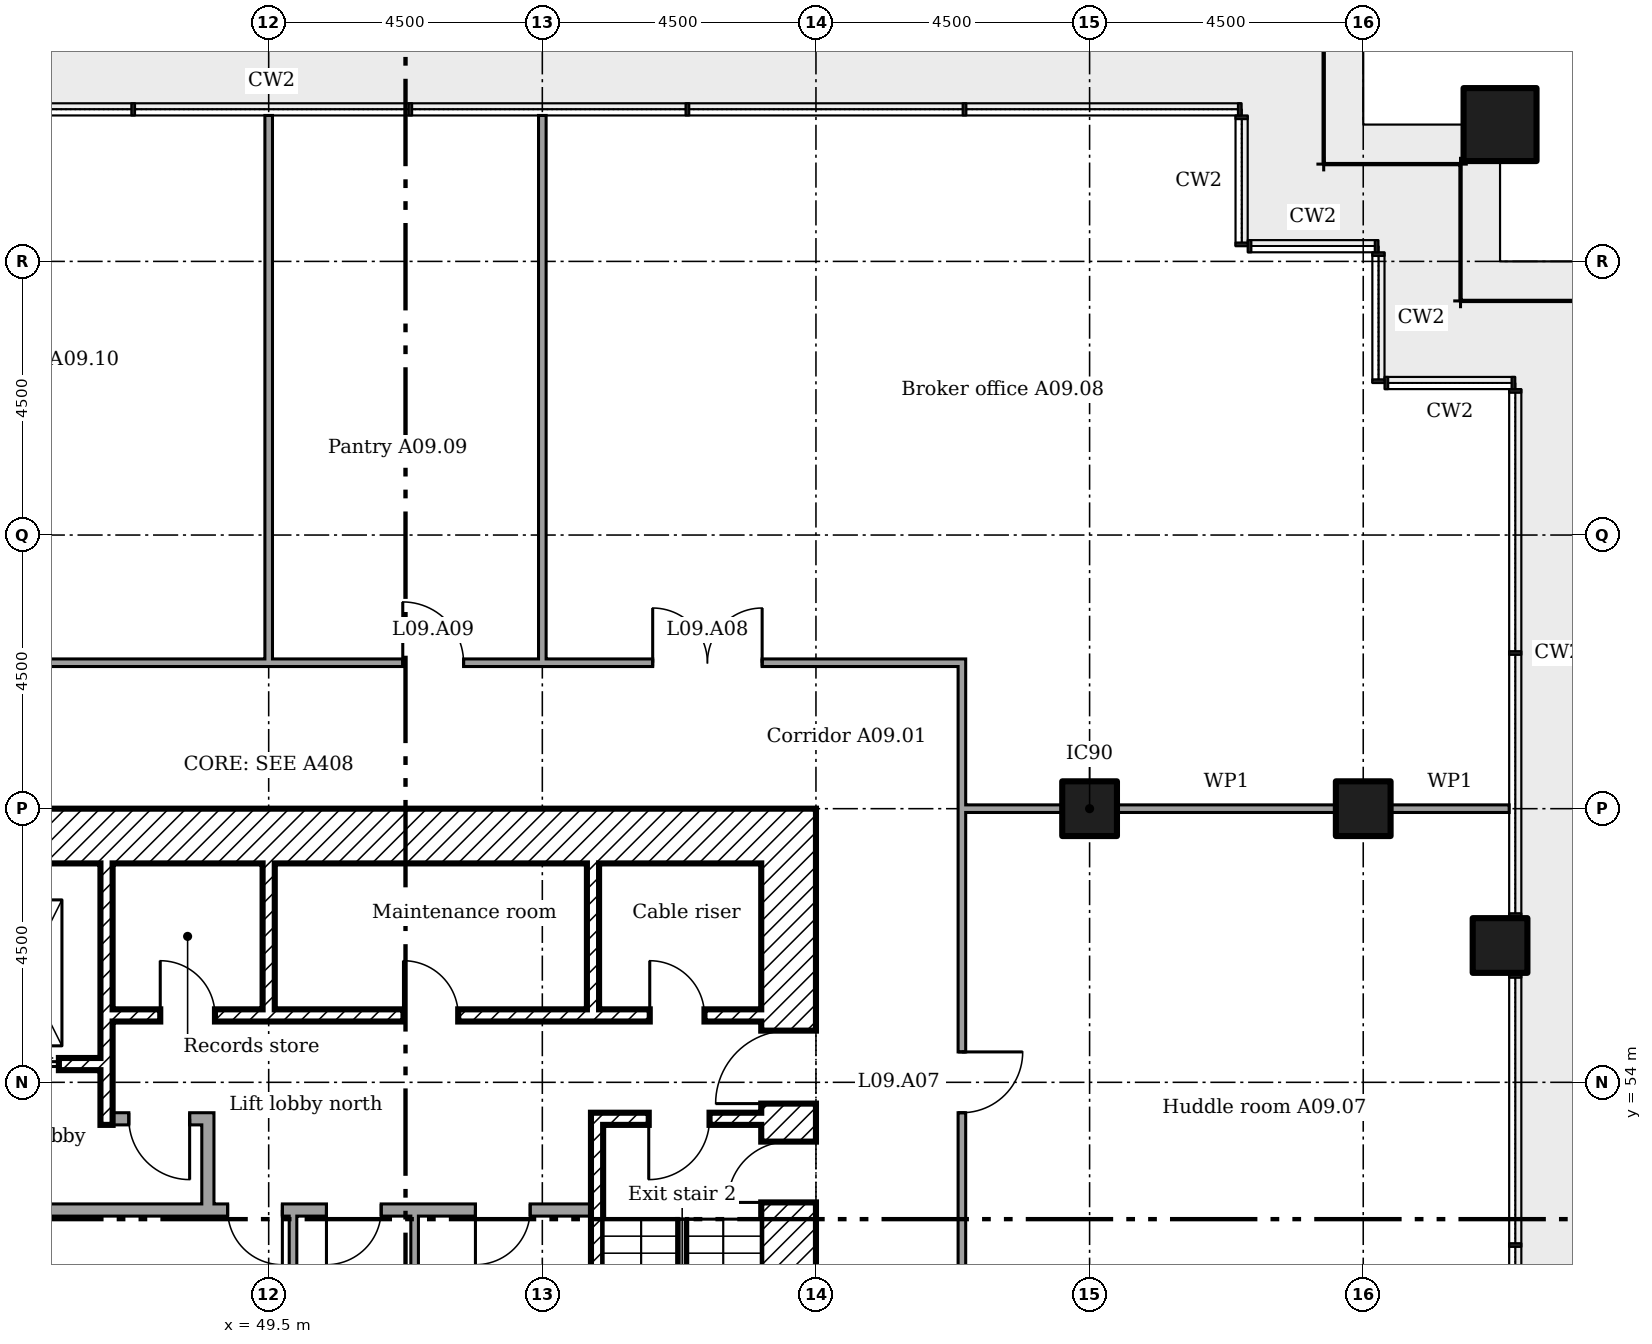
"""IFC4 building model, lengths in metres.
Left out: names, types, materials, properties, quantities, classifications, styles, units other than length and angle.
Written with IfcOpenShell. Run it as: python <this file> out.ifc"""

import sys

from ifc_helpers import new_model, si_unit, direction, frame, frame_2d, origin, origin_2d, place, context, subcontext, project, spatial, rectangle, extrude, element, fill, save


model = new_model("IFC4")
c1 = context("Model", 3, precision=1e-05, world=origin(), true_north=direction((0.0, 1.0)))
c2 = subcontext(c1, "Body", "Model", "MODEL_VIEW")
j1 = project(units=[si_unit("LENGTHUNIT", "METRE"), si_unit("PLANEANGLEUNIT", "RADIAN")], contexts=[c1])
p1 = place(None, origin())
s1 = spatial("IfcSite", under=j1, at=p1, CompositionType="ELEMENT")
p2 = place(p1, origin())
s2 = spatial("IfcBuilding", under=s1, at=p2, CompositionType="ELEMENT")
p3 = place(p2, frame((0.0, 0.0, 43.0)))
s3 = spatial("IfcBuildingStorey", under=s2, at=p3, CompositionType="ELEMENT", Elevation=43.0)
p4 = place(p3, frame((69.75, 69.75, 0.0)))
e1 = element("IfcColumn", 1, at=p4, inside=s3, PredefinedType="COLUMN", context=c2, shape_type="SweptSolid", body=[
    extrude(rectangle(XDim=1.2, YDim=1.2, at=origin_2d()), origin(), (0.0, 0.0, 1.0), 4.4),
])
for number, where in (
    (2, (63.0, 58.5, 0.0)),
    (3, (67.5, 58.5, 0.0)),
    (4, (69.75, 56.25, 0.0)),
):
    element("IfcColumn", number, at=place(p3, frame(where)), inside=s3, PredefinedType="COLUMN", context=c2, shape_type="SweptSolid", body=[
        extrude(rectangle(XDim=0.9, YDim=0.9, at=origin_2d()), origin(), (0.0, 0.0, 1.0), 4.4),
    ])
p5 = place(p3, frame((58.05, 40.5, 0.0), z_axis=(0.0, 0.0, 1.0), x_axis=(0.0, 1.0, 0.0)))
e5 = element("IfcWall", 5, at=p5, inside=s3, PredefinedType="SHEAR", context=c2, shape_type="SweptSolid", body=[
    extrude(rectangle(XDim=18.0, YDim=0.9, at=frame_2d((9.0, 0.0))), origin(), (0.0, 0.0, 1.0), 4.15),
])
p6 = place(p5, frame((13.15, 0.0, 0.0)))
e6 = element("IfcOpeningElement", 6, at=p6, cuts=e5, PredefinedType="OPENING", context=c2, shape_type="SweptSolid", body=[
    extrude(rectangle(XDim=1.2, YDim=2.1, at=frame_2d((0.6, 1.05))), frame((0.0, 0.46, 0.0), z_axis=(0.0, -1.0, 0.0), x_axis=(1.0, 0.0, 0.0)), (0.0, 0.0, 1.0), 0.92),
])
p7 = place(p5, frame((3.9, 0.0, 0.0)))
e7 = element("IfcOpeningElement", 7, at=p7, cuts=e5, PredefinedType="OPENING", context=c2, shape_type="SweptSolid", body=[
    extrude(rectangle(XDim=1.8, YDim=2.1, at=frame_2d((0.9, 1.05))), frame((0.0, 0.46, 0.0), z_axis=(0.0, -1.0, 0.0), x_axis=(1.0, 0.0, 0.0)), (0.0, 0.0, 1.0), 0.92),
])
p8 = place(p5, frame((11.525, 0.0, 0.0)))
e8 = element("IfcOpeningElement", 8, at=p8, cuts=e5, PredefinedType="OPENING", context=c2, shape_type="SweptSolid", body=[
    extrude(rectangle(XDim=1.0, YDim=2.1, at=frame_2d((0.5, 1.05))), frame((0.0, 0.46, 0.0), z_axis=(0.0, -1.0, 0.0), x_axis=(1.0, 0.0, 0.0)), (0.0, 0.0, 1.0), 0.92),
])
p9 = place(p3, frame((41.4, 58.05, 0.0)))
e9 = element("IfcWall", 9, at=p9, inside=s3, PredefinedType="SHEAR", context=c2, shape_type="SweptSolid", body=[
    extrude(rectangle(XDim=16.2, YDim=0.9, at=frame_2d((8.1, 0.0))), origin(), (0.0, 0.0, 1.0), 4.15),
])
p10 = place(p3, frame((46.833, 57.6, 0.0), z_axis=(0.0, 0.0, 1.0), x_axis=(0.0, -1.0, 0.0)))
e10 = element("IfcWall", 10, at=p10, inside=s3, PredefinedType="SHEAR", context=c2, shape_type="SweptSolid", body=[
    extrude(rectangle(XDim=4.3, YDim=0.2, at=frame_2d((2.15, 0.0))), origin(), (0.0, 0.0, 1.0), 4.15),
])
for number, where, z_axis, x_axis in (
    (11, (49.5, 57.6, 0.0), (0.0, 0.0, 1.0), (0.0, -1.0, 0.0)),
    (12, (54.833, 57.6, 0.0), (0.0, 0.0, 1.0), (0.0, -1.0, 0.0)),
):
    element("IfcWall", number, at=place(p3, frame(where, z_axis=z_axis, x_axis=x_axis)), inside=s3, PredefinedType="SHEAR", context=c2, shape_type="SweptSolid", body=[
        extrude(rectangle(XDim=2.4, YDim=0.2, at=frame_2d((1.2, 0.0))), origin(), (0.0, 0.0, 1.0), 4.15),
    ])
p11 = place(p3, frame((48.5, 51.9, 0.0), z_axis=(0.0, 0.0, 1.0), x_axis=(0.0, 1.0, 0.0)))
e13 = element("IfcWall", 13, at=p11, inside=s3, PredefinedType="PARTITIONING", context=c2, shape_type="SweptSolid", body=[
    extrude(rectangle(XDim=1.6, YDim=0.2, at=frame_2d((0.8, 0.0))), origin(), (0.0, 0.0, 1.0), 4.15),
])
p12 = place(p3, frame((46.933, 53.4, 0.0)))
e14 = element("IfcWall", 14, at=p12, inside=s3, PredefinedType="PARTITIONING", context=c2, shape_type="SweptSolid", body=[
    extrude(rectangle(XDim=1.467, YDim=0.2, at=frame_2d((0.733, 0.0))), origin(), (0.0, 0.0, 1.0), 4.15),
])
p13 = place(p12, frame((0.267, 0.0, 0.0)))
e15 = element("IfcOpeningElement", 15, at=p13, cuts=e14, PredefinedType="OPENING", context=c2, shape_type="SweptSolid", body=[
    extrude(rectangle(XDim=1.0, YDim=2.1, at=frame_2d((0.5, 1.05))), frame((0.0, 0.11, 0.0), z_axis=(0.0, -1.0, 0.0), x_axis=(1.0, 0.0, 0.0)), (0.0, 0.0, 1.0), 0.22),
])
p14 = place(p3, frame((46.933, 55.1, 0.0)))
e16 = element("IfcWall", 16, at=p14, inside=s3, PredefinedType="SHEAR", context=c2, shape_type="SweptSolid", body=[
    extrude(rectangle(XDim=10.667, YDim=0.2, at=frame_2d((5.333, 0.0))), origin(), (0.0, 0.0, 1.0), 4.15),
])
p15 = place(p14, frame((8.833, 0.0, 0.0)))
e17 = element("IfcOpeningElement", 17, at=p15, cuts=e16, PredefinedType="OPENING", context=c2, shape_type="SweptSolid", body=[
    extrude(rectangle(XDim=0.9, YDim=2.1, at=frame_2d((0.45, 1.05))), frame((0.0, 0.11, 0.0), z_axis=(0.0, -1.0, 0.0), x_axis=(1.0, 0.0, 0.0)), (0.0, 0.0, 1.0), 0.22),
])
p16 = place(p14, frame((0.783, 0.0, 0.0)))
e18 = element("IfcOpeningElement", 18, at=p16, cuts=e16, PredefinedType="OPENING", context=c2, shape_type="SweptSolid", body=[
    extrude(rectangle(XDim=0.9, YDim=2.1, at=frame_2d((0.45, 1.05))), frame((0.0, 0.11, 0.0), z_axis=(0.0, -1.0, 0.0), x_axis=(1.0, 0.0, 0.0)), (0.0, 0.0, 1.0), 0.22),
])
p17 = place(p14, frame((4.783, 0.0, 0.0)))
e19 = element("IfcOpeningElement", 19, at=p17, cuts=e16, PredefinedType="OPENING", context=c2, shape_type="SweptSolid", body=[
    extrude(rectangle(XDim=0.9, YDim=2.1, at=frame_2d((0.45, 1.05))), frame((0.0, 0.11, 0.0), z_axis=(0.0, -1.0, 0.0), x_axis=(1.0, 0.0, 0.0)), (0.0, 0.0, 1.0), 0.22),
])
p18 = place(p3, frame((41.4, 54.3, 0.0)))
e20 = element("IfcWall", 20, at=p18, inside=s3, PredefinedType="SHEAR", context=c2, shape_type="SweptSolid", body=[
    extrude(rectangle(XDim=5.333, YDim=0.2, at=frame_2d((2.667, 0.0))), origin(), (0.0, 0.0, 1.0), 4.15),
])
p19 = place(p18, frame((0.883, 0.0, 0.0)))
e21 = element("IfcOpeningElement", 21, at=p19, cuts=e20, PredefinedType="OPENING", context=c2, shape_type="SweptSolid", body=[
    extrude(rectangle(XDim=1.1, YDim=2.1, at=frame_2d((0.55, 1.05))), frame((0.0, 0.11, 0.0), z_axis=(0.0, -1.0, 0.0), x_axis=(1.0, 0.0, 0.0)), (0.0, 0.0, 1.0), 0.22),
])
p20 = place(p18, frame((3.55, 0.0, 0.0)))
e22 = element("IfcOpeningElement", 22, at=p20, cuts=e20, PredefinedType="OPENING", context=c2, shape_type="SweptSolid", body=[
    extrude(rectangle(XDim=1.1, YDim=2.1, at=frame_2d((0.55, 1.05))), frame((0.0, 0.11, 0.0), z_axis=(0.0, -1.0, 0.0), x_axis=(1.0, 0.0, 0.0)), (0.0, 0.0, 1.0), 0.22),
])
p21 = place(p3, frame((54.8, 53.4, 0.0)))
e23 = element("IfcWall", 23, at=p21, inside=s3, PredefinedType="SHEAR", context=c2, shape_type="SweptSolid", body=[
    extrude(rectangle(XDim=2.8, YDim=0.2, at=frame_2d((1.4, 0.0))), origin(), (0.0, 0.0, 1.0), 4.15),
])
p22 = place(p21, frame((0.95, 0.0, 0.0)))
e24 = element("IfcOpeningElement", 24, at=p22, cuts=e23, PredefinedType="OPENING", context=c2, shape_type="SweptSolid", body=[
    extrude(rectangle(XDim=1.0, YDim=2.1, at=frame_2d((0.5, 1.05))), frame((0.0, 0.11, 0.0), z_axis=(0.0, -1.0, 0.0), x_axis=(1.0, 0.0, 0.0)), (0.0, 0.0, 1.0), 0.22),
])
p23 = place(p3, frame((54.9, 46.8, 0.0), z_axis=(0.0, 0.0, 1.0), x_axis=(0.0, 1.0, 0.0)))
e25 = element("IfcWall", 25, at=p23, inside=s3, PredefinedType="SHEAR", context=c2, shape_type="SweptSolid", body=[
    extrude(rectangle(XDim=6.5, YDim=0.2, at=frame_2d((3.25, 0.0))), origin(), (0.0, 0.0, 1.0), 4.15),
])
p24 = place(p3, frame((44.2, 51.9, 0.0)))
e26 = element("IfcWall", 26, at=p24, inside=s3, PredefinedType="PARTITIONING", context=c2, shape_type="SweptSolid", body=[
    extrude(rectangle(XDim=10.6, YDim=0.2, at=frame_2d((5.3, 0.0))), origin(), (0.0, 0.0, 1.0), 4.15),
])
p25 = place(p24, frame((4.625, 0.0, 0.0)))
e27 = element("IfcOpeningElement", 27, at=p25, cuts=e26, PredefinedType="OPENING", context=c2, shape_type="SweptSolid", body=[
    extrude(rectangle(XDim=0.9, YDim=2.1, at=frame_2d((0.45, 1.05))), frame((0.0, 0.11, 0.0), z_axis=(0.0, -1.0, 0.0), x_axis=(1.0, 0.0, 0.0)), (0.0, 0.0, 1.0), 0.22),
])
p26 = place(p24, frame((6.25, 0.0, 0.0)))
e28 = element("IfcOpeningElement", 28, at=p26, cuts=e26, PredefinedType="OPENING", context=c2, shape_type="SweptSolid", body=[
    extrude(rectangle(XDim=0.9, YDim=2.1, at=frame_2d((0.45, 1.05))), frame((0.0, 0.11, 0.0), z_axis=(0.0, -1.0, 0.0), x_axis=(1.0, 0.0, 0.0)), (0.0, 0.0, 1.0), 0.22),
])
p27 = place(p24, frame((8.7, 0.0, 0.0)))
e29 = element("IfcOpeningElement", 29, at=p27, cuts=e26, PredefinedType="OPENING", context=c2, shape_type="SweptSolid", body=[
    extrude(rectangle(XDim=0.9, YDim=2.1, at=frame_2d((0.45, 1.05))), frame((0.0, 0.11, 0.0), z_axis=(0.0, -1.0, 0.0), x_axis=(1.0, 0.0, 0.0)), (0.0, 0.0, 1.0), 0.22),
])
for number, where, z_axis, x_axis in (
    (30, (49.9, 48.163, 0.0), (0.0, 0.0, 1.0), (0.0, 1.0, 0.0)),
    (31, (51.9, 48.163, 0.0), (0.0, 0.0, 1.0), (0.0, 1.0, 0.0)),
):
    element("IfcWall", number, at=place(p3, frame(where, z_axis=z_axis, x_axis=x_axis)), inside=s3, PredefinedType="PARTITIONING", context=c2, shape_type="SweptSolid", body=[
        extrude(rectangle(XDim=3.637, YDim=0.125, at=frame_2d((1.819, 0.0))), origin(), (0.0, 0.0, 1.0), 4.15),
    ])
p28 = place(p3, frame((60.9, 58.5, 0.0)))
e32 = element("IfcWall", 32, at=p28, inside=s3, PredefinedType="PARTITIONING", context=c2, shape_type="SweptSolid", body=[
    extrude(rectangle(XDim=1.65, YDim=0.125, at=frame_2d((0.825, 0.0))), origin(), (0.0, 0.0, 1.0), 3.476),
])
p29 = place(p3, frame((63.45, 58.5, 0.0)))
e33 = element("IfcWall", 33, at=p29, inside=s3, PredefinedType="PARTITIONING", context=c2, shape_type="SweptSolid", body=[
    extrude(rectangle(XDim=3.6, YDim=0.125, at=frame_2d((1.8, 0.0))), origin(), (0.0, 0.0, 1.0), 3.476),
])
p30 = place(p3, frame((67.95, 58.5, 0.0)))
e34 = element("IfcWall", 34, at=p30, inside=s3, PredefinedType="PARTITIONING", context=c2, shape_type="SweptSolid", body=[
    extrude(rectangle(XDim=1.95, YDim=0.125, at=frame_2d((0.975, 0.0))), origin(), (0.0, 0.0, 1.0), 3.476),
])
p31 = place(p3, frame((38.038, 60.9, 0.0)))
e35 = element("IfcWall", 35, at=p31, inside=s3, PredefinedType="PARTITIONING", context=c2, shape_type="SweptSolid", body=[
    extrude(rectangle(XDim=22.925, YDim=0.125, at=frame_2d((11.462, 0.0))), origin(), (0.0, 0.0, 1.0), 4.25),
])
p32 = place(p31, frame((17.778, 0.0, 0.0)))
e36 = element("IfcOpeningElement", 36, at=p32, cuts=e35, PredefinedType="OPENING", context=c2, shape_type="SweptSolid", body=[
    extrude(rectangle(XDim=1.8, YDim=2.1, at=frame_2d((0.9, 1.05))), frame((0.0, 0.073, 0.0), z_axis=(0.0, -1.0, 0.0), x_axis=(1.0, 0.0, 0.0)), (0.0, 0.0, 1.0), 0.145),
])
p33 = place(p31, frame((13.667, 0.0, 0.0)))
e37 = element("IfcOpeningElement", 37, at=p33, cuts=e35, PredefinedType="OPENING", context=c2, shape_type="SweptSolid", body=[
    extrude(rectangle(XDim=1.0, YDim=2.1, at=frame_2d((0.5, 1.05))), frame((0.0, 0.073, 0.0), z_axis=(0.0, -1.0, 0.0), x_axis=(1.0, 0.0, 0.0)), (0.0, 0.0, 1.0), 0.145),
])
p34 = place(p31, frame((6.462, 0.0, 0.0)))
e38 = element("IfcOpeningElement", 38, at=p34, cuts=e35, PredefinedType="OPENING", context=c2, shape_type="SweptSolid", body=[
    extrude(rectangle(XDim=1.0, YDim=2.1, at=frame_2d((0.5, 1.05))), frame((0.0, 0.073, 0.0), z_axis=(0.0, -1.0, 0.0), x_axis=(1.0, 0.0, 0.0)), (0.0, 0.0, 1.0), 0.145),
])
for number, where, z_axis, x_axis in (
    (39, (49.5, 60.9, 0.0), (0.0, 0.0, 1.0), (0.0, 1.0, 0.0)),
    (40, (54.0, 60.9, 0.0), (0.0, 0.0, 1.0), (0.0, 1.0, 0.0)),
):
    element("IfcWall", number, at=place(p3, frame(where, z_axis=z_axis, x_axis=x_axis)), inside=s3, PredefinedType="PARTITIONING", context=c2, shape_type="SweptSolid", body=[
        extrude(rectangle(XDim=9.0, YDim=0.125, at=frame_2d((4.5, 0.0))), origin(), (0.0, 0.0, 1.0), 3.566),
    ])
p35 = place(p3, frame((60.9, 37.863, 0.0), z_axis=(0.0, 0.0, 1.0), x_axis=(0.0, 1.0, 0.0)))
e41 = element("IfcWall", 41, at=p35, inside=s3, PredefinedType="PARTITIONING", context=c2, shape_type="SweptSolid", body=[
    extrude(rectangle(XDim=22.975, YDim=0.125, at=frame_2d((11.487, 0.0))), origin(), (0.0, 0.0, 1.0), 4.25),
])
p36 = place(p35, frame((3.933, 0.0, 0.0)))
e42 = element("IfcOpeningElement", 42, at=p36, cuts=e41, PredefinedType="OPENING", context=c2, shape_type="SweptSolid", body=[
    extrude(rectangle(XDim=1.0, YDim=2.1, at=frame_2d((0.5, 1.05))), frame((0.0, 0.073, 0.0), z_axis=(0.0, -1.0, 0.0), x_axis=(1.0, 0.0, 0.0)), (0.0, 0.0, 1.0), 0.145),
])
p37 = place(p35, frame((9.343, 0.0, 0.0)))
e43 = element("IfcOpeningElement", 43, at=p37, cuts=e41, PredefinedType="OPENING", context=c2, shape_type="SweptSolid", body=[
    extrude(rectangle(XDim=1.0, YDim=2.1, at=frame_2d((0.5, 1.05))), frame((0.0, 0.073, 0.0), z_axis=(0.0, -1.0, 0.0), x_axis=(1.0, 0.0, 0.0)), (0.0, 0.0, 1.0), 0.145),
])
p38 = place(p35, frame((15.637, 0.0, 0.0)))
e44 = element("IfcOpeningElement", 44, at=p38, cuts=e41, PredefinedType="OPENING", context=c2, shape_type="SweptSolid", body=[
    extrude(rectangle(XDim=1.0, YDim=2.1, at=frame_2d((0.5, 1.05))), frame((0.0, 0.073, 0.0), z_axis=(0.0, -1.0, 0.0), x_axis=(1.0, 0.0, 0.0)), (0.0, 0.0, 1.0), 0.145),
])
p39 = place(p6, origin())
e45 = element("IfcDoor", 45, at=p39, inside=s3, OperationType="SINGLE_SWING_RIGHT", PredefinedType="DOOR", context=c2, shape_type="SweptSolid", body=[
    extrude(rectangle(XDim=1.2, YDim=2.1, at=frame_2d((0.6, 1.05))), frame((0.0, 0.025, 0.0), z_axis=(0.0, -1.0, 0.0), x_axis=(1.0, 0.0, 0.0)), (0.0, 0.0, 1.0), 0.05),
])
fill(e6, e45)
p40 = place(p22, frame((1.0, 0.0, 0.0), x_axis=(-1.0, 0.0, 0.0)))
e46 = element("IfcDoor", 46, at=p40, inside=s3, OperationType="SINGLE_SWING_LEFT", PredefinedType="DOOR", context=c2, shape_type="SweptSolid", body=[
    extrude(rectangle(XDim=1.0, YDim=2.1, at=frame_2d((0.5, 1.05))), frame((0.0, 0.025, 0.0), z_axis=(0.0, -1.0, 0.0), x_axis=(1.0, 0.0, 0.0)), (0.0, 0.0, 1.0), 0.05),
])
fill(e24, e46)
p41 = place(p8, origin())
e47 = element("IfcDoor", 47, at=p41, inside=s3, OperationType="SINGLE_SWING_RIGHT", PredefinedType="DOOR", context=c2, shape_type="SweptSolid", body=[
    extrude(rectangle(XDim=1.0, YDim=2.1, at=frame_2d((0.5, 1.05))), frame((0.0, 0.025, 0.0), z_axis=(0.0, -1.0, 0.0), x_axis=(1.0, 0.0, 0.0)), (0.0, 0.0, 1.0), 0.05),
])
fill(e8, e47)
p42 = place(p13, frame((1.0, 0.0, 0.0), x_axis=(-1.0, 0.0, 0.0)))
e48 = element("IfcDoor", 48, at=p42, inside=s3, OperationType="SINGLE_SWING_RIGHT", PredefinedType="DOOR", context=c2, shape_type="SweptSolid", body=[
    extrude(rectangle(XDim=1.0, YDim=2.1, at=frame_2d((0.5, 1.05))), frame((0.0, 0.025, 0.0), z_axis=(0.0, -1.0, 0.0), x_axis=(1.0, 0.0, 0.0)), (0.0, 0.0, 1.0), 0.05),
])
fill(e15, e48)
p43 = place(p15, origin())
e49 = element("IfcDoor", 49, at=p43, inside=s3, OperationType="SINGLE_SWING_RIGHT", PredefinedType="DOOR", context=c2, shape_type="SweptSolid", body=[
    extrude(rectangle(XDim=0.9, YDim=2.1, at=frame_2d((0.45, 1.05))), frame((0.0, 0.025, 0.0), z_axis=(0.0, -1.0, 0.0), x_axis=(1.0, 0.0, 0.0)), (0.0, 0.0, 1.0), 0.05),
])
fill(e17, e49)
p44 = place(p16, origin())
e50 = element("IfcDoor", 50, at=p44, inside=s3, OperationType="SINGLE_SWING_RIGHT", PredefinedType="DOOR", context=c2, shape_type="SweptSolid", body=[
    extrude(rectangle(XDim=0.9, YDim=2.1, at=frame_2d((0.45, 1.05))), frame((0.0, 0.025, 0.0), z_axis=(0.0, -1.0, 0.0), x_axis=(1.0, 0.0, 0.0)), (0.0, 0.0, 1.0), 0.05),
])
fill(e18, e50)
p45 = place(p17, origin())
e51 = element("IfcDoor", 51, at=p45, inside=s3, OperationType="SINGLE_SWING_RIGHT", PredefinedType="DOOR", context=c2, shape_type="SweptSolid", body=[
    extrude(rectangle(XDim=0.9, YDim=2.1, at=frame_2d((0.45, 1.05))), frame((0.0, 0.025, 0.0), z_axis=(0.0, -1.0, 0.0), x_axis=(1.0, 0.0, 0.0)), (0.0, 0.0, 1.0), 0.05),
])
fill(e19, e51)
p46 = place(p25, frame((0.9, 0.0, 0.0), x_axis=(-1.0, 0.0, 0.0)))
e52 = element("IfcDoor", 52, at=p46, inside=s3, OperationType="SINGLE_SWING_RIGHT", PredefinedType="DOOR", context=c2, shape_type="SweptSolid", body=[
    extrude(rectangle(XDim=0.9, YDim=2.1, at=frame_2d((0.45, 1.05))), frame((0.0, 0.025, 0.0), z_axis=(0.0, -1.0, 0.0), x_axis=(1.0, 0.0, 0.0)), (0.0, 0.0, 1.0), 0.05),
])
fill(e27, e52)
p47 = place(p26, frame((0.9, 0.0, 0.0), x_axis=(-1.0, 0.0, 0.0)))
e53 = element("IfcDoor", 53, at=p47, inside=s3, OperationType="SINGLE_SWING_LEFT", PredefinedType="DOOR", context=c2, shape_type="SweptSolid", body=[
    extrude(rectangle(XDim=0.9, YDim=2.1, at=frame_2d((0.45, 1.05))), frame((0.0, 0.025, 0.0), z_axis=(0.0, -1.0, 0.0), x_axis=(1.0, 0.0, 0.0)), (0.0, 0.0, 1.0), 0.05),
])
fill(e28, e53)
p48 = place(p27, frame((0.9, 0.0, 0.0), x_axis=(-1.0, 0.0, 0.0)))
e54 = element("IfcDoor", 54, at=p48, inside=s3, OperationType="SINGLE_SWING_LEFT", PredefinedType="DOOR", context=c2, shape_type="SweptSolid", body=[
    extrude(rectangle(XDim=0.9, YDim=2.1, at=frame_2d((0.45, 1.05))), frame((0.0, 0.025, 0.0), z_axis=(0.0, -1.0, 0.0), x_axis=(1.0, 0.0, 0.0)), (0.0, 0.0, 1.0), 0.05),
])
fill(e29, e54)
p49 = place(p20, origin())
e55 = element("IfcDoor", 55, at=p49, inside=s3, OperationType="SLIDING_TO_LEFT", PredefinedType="DOOR", context=c2, shape_type="SweptSolid", body=[
    extrude(rectangle(XDim=1.1, YDim=2.1, at=frame_2d((0.55, 1.05))), frame((0.0, 0.025, 0.0), z_axis=(0.0, -1.0, 0.0), x_axis=(1.0, 0.0, 0.0)), (0.0, 0.0, 1.0), 0.05),
])
fill(e22, e55)
p50 = place(p38, frame((1.0, 0.0, 0.0), x_axis=(-1.0, 0.0, 0.0)))
e56 = element("IfcDoor", 56, at=p50, inside=s3, OperationType="SINGLE_SWING_RIGHT", PredefinedType="DOOR", context=c2, shape_type="SweptSolid", body=[
    extrude(rectangle(XDim=1.0, YDim=2.1, at=frame_2d((0.5, 1.05))), frame((0.0, 0.025, 0.0), z_axis=(0.0, -1.0, 0.0), x_axis=(1.0, 0.0, 0.0)), (0.0, 0.0, 1.0), 0.05),
])
fill(e44, e56)
p51 = place(p32, origin())
e57 = element("IfcDoor", 57, at=p51, inside=s3, OperationType="DOUBLE_DOOR_SINGLE_SWING", PredefinedType="DOOR", context=c2, shape_type="SweptSolid", body=[
    extrude(rectangle(XDim=1.8, YDim=2.1, at=frame_2d((0.9, 1.05))), frame((0.0, 0.025, 0.0), z_axis=(0.0, -1.0, 0.0), x_axis=(1.0, 0.0, 0.0)), (0.0, 0.0, 1.0), 0.05),
])
fill(e36, e57)
p52 = place(p33, origin())
e58 = element("IfcDoor", 58, at=p52, inside=s3, OperationType="SINGLE_SWING_RIGHT", PredefinedType="DOOR", context=c2, shape_type="SweptSolid", body=[
    extrude(rectangle(XDim=1.0, YDim=2.1, at=frame_2d((0.5, 1.05))), frame((0.0, 0.025, 0.0), z_axis=(0.0, -1.0, 0.0), x_axis=(1.0, 0.0, 0.0)), (0.0, 0.0, 1.0), 0.05),
])
fill(e37, e58)
save(model, sys.argv[1])
